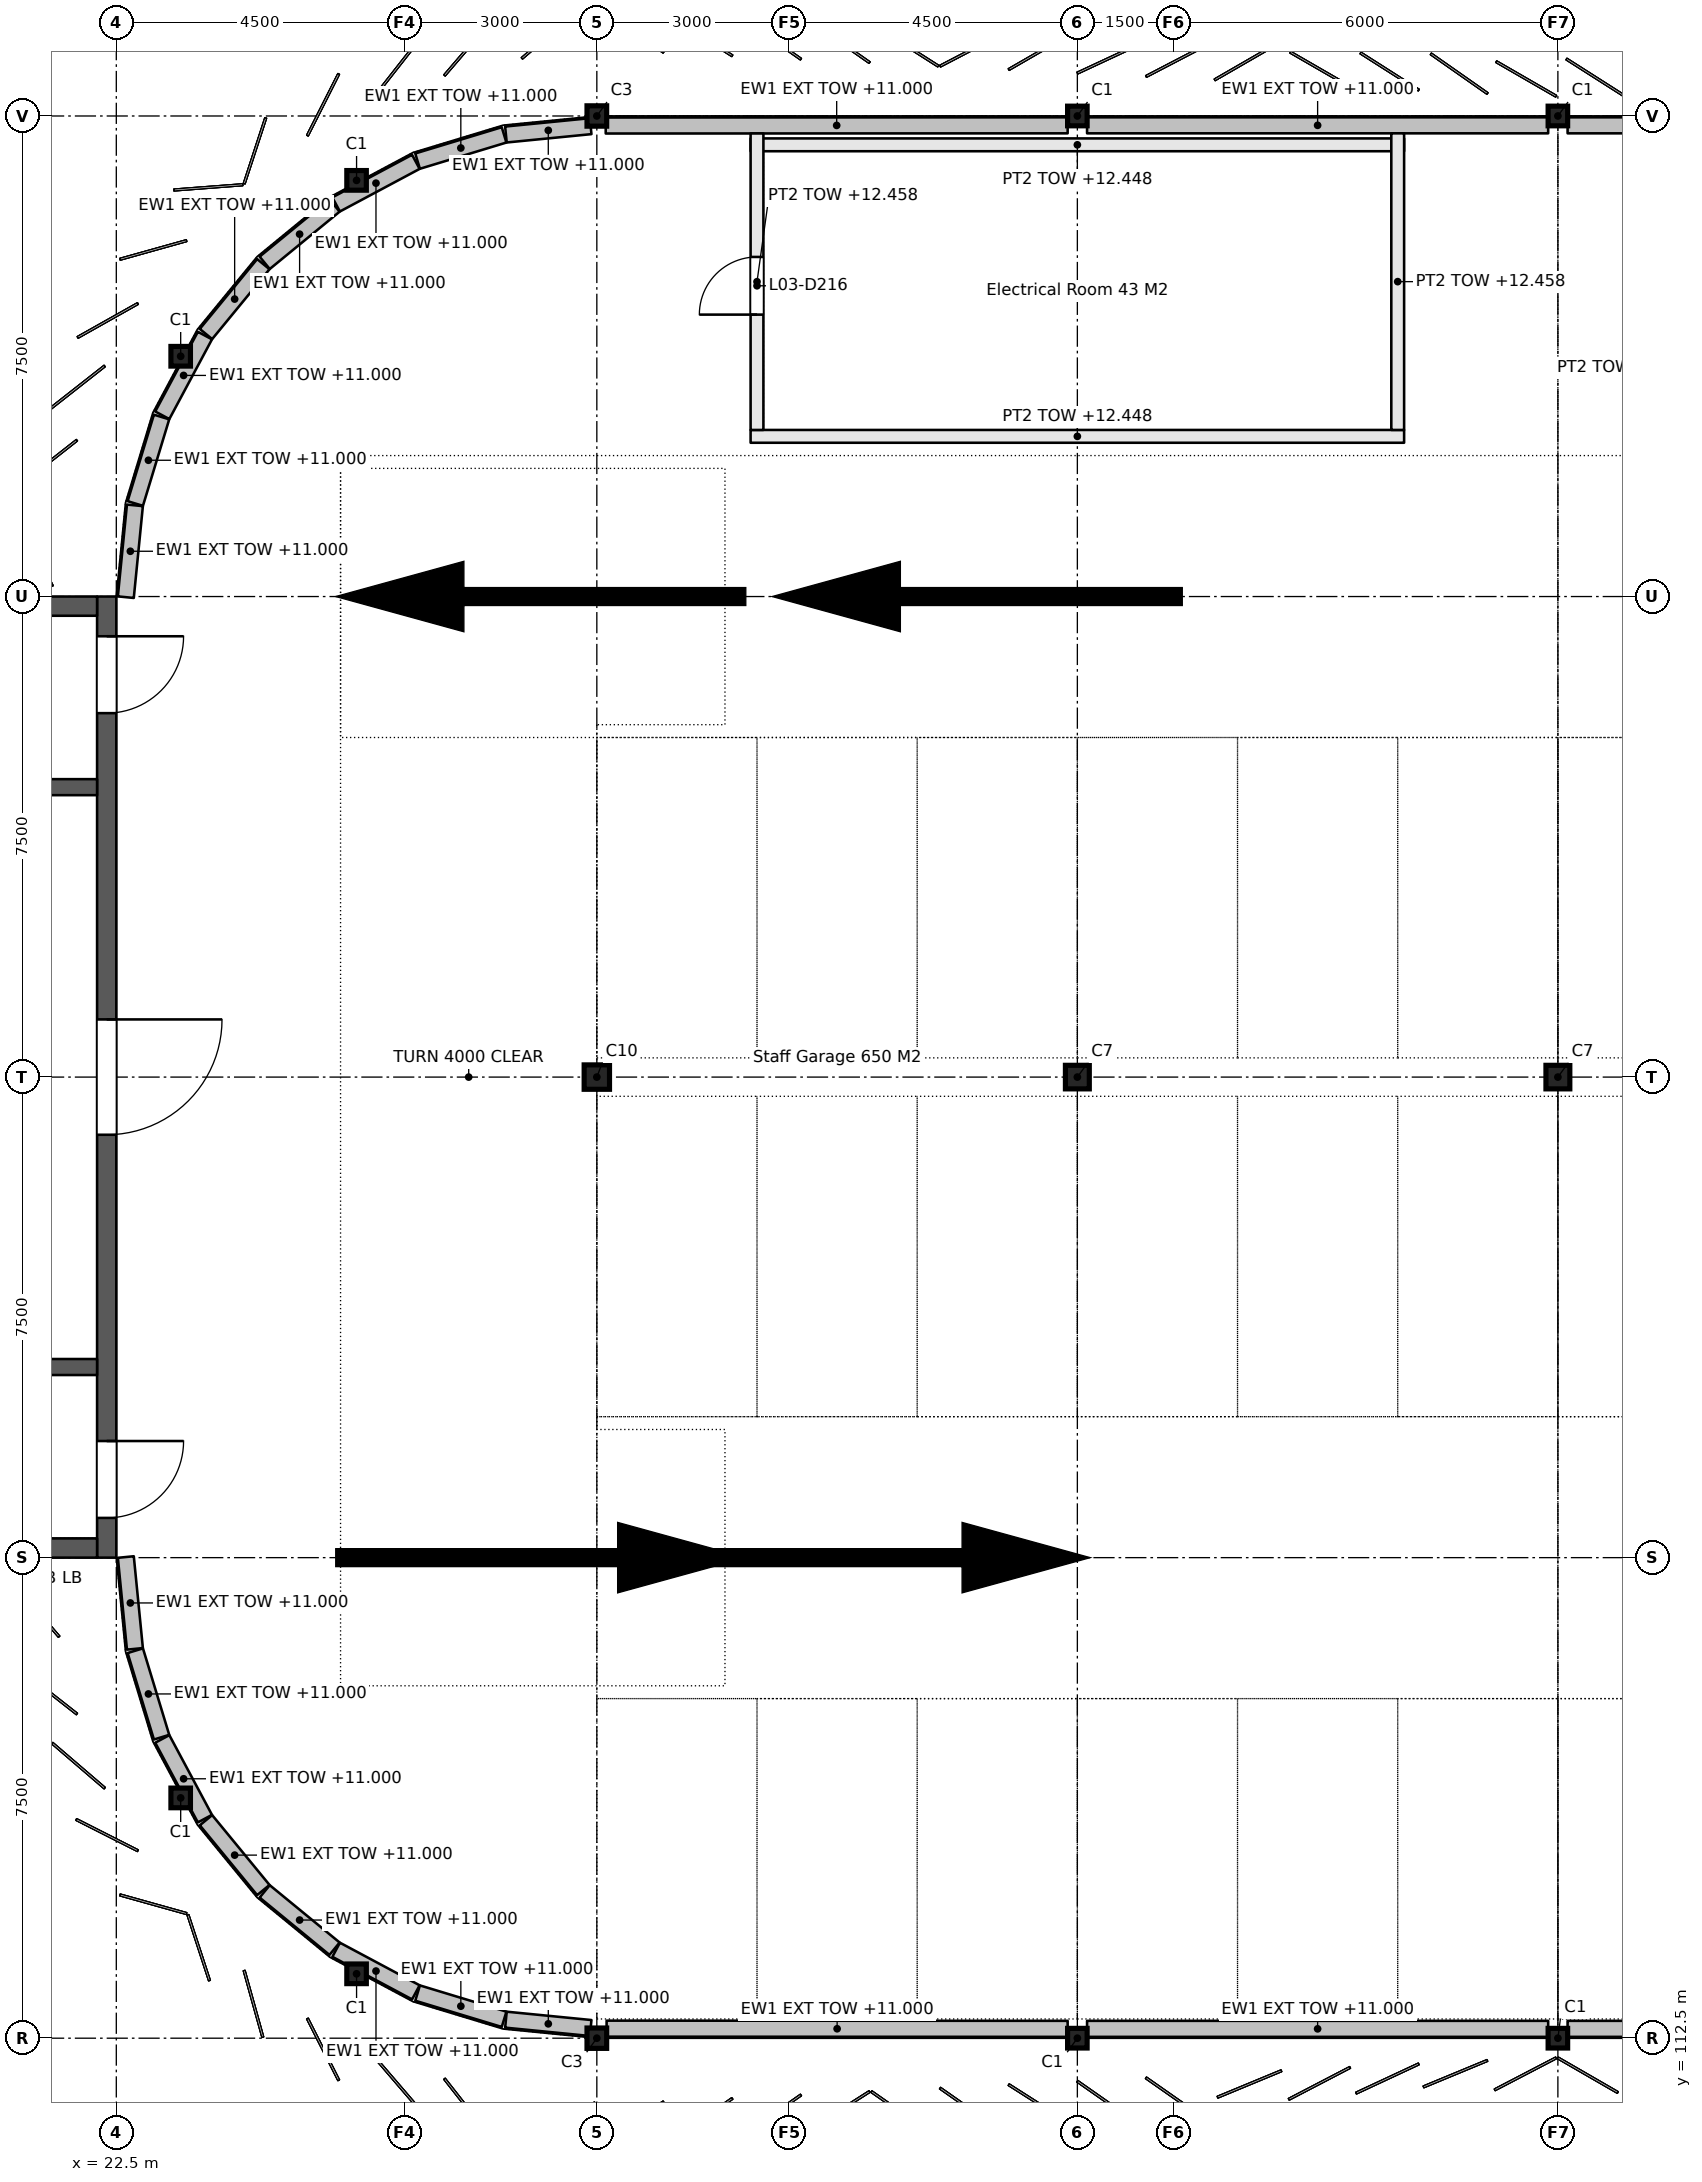
"""IFC4 building model, lengths in metres.
Left out: names, types, materials, properties, quantities, classifications, styles, units other than length and angle.
Written with IfcOpenShell. Run it as: python <this file> out.ifc"""

import sys

from ifc_helpers import new_model, si_unit, direction, frame, frame_2d, origin, origin_2d, place, context, subcontext, project, spatial, rectangle, i_section, extrude, element, fill, save


model = new_model("IFC4")
c1 = context("Model", 3, precision=1e-05, world=origin(), true_north=direction((0.0, 1.0)))
c2 = subcontext(c1, "Body", "Model", "MODEL_VIEW")
j1 = project(units=[si_unit("LENGTHUNIT", "METRE"), si_unit("PLANEANGLEUNIT", "RADIAN")], contexts=[c1])
p1 = place(None, origin())
s1 = spatial("IfcSite", under=j1, at=p1, CompositionType="ELEMENT")
p2 = place(p1, origin())
s2 = spatial("IfcBuilding", under=s1, at=p2, CompositionType="ELEMENT")
p3 = place(p2, frame((0.0, 0.0, 9.9)))
s3 = spatial("IfcBuildingStorey", under=s2, at=p3, CompositionType="ELEMENT", Elevation=9.9)
p4 = place(p3, frame((30.0, 112.5, 0.0), z_axis=(0.0, 0.0, 1.0), x_axis=(1.0, 0.0, 0.0)))
e1 = element("IfcColumn", 1, at=p4, inside=s3, PredefinedType="COLUMN", context=c2, shape_type="SweptSolid", body=[
    extrude(i_section(OverallWidth=0.307, OverallDepth=0.318, WebThickness=0.013, FlangeThickness=0.021, FilletRadius=0.015, at=origin_2d()), origin(), (0.0, 0.0, 1.0), 3.3),
])
p5 = place(p3, frame((30.0, 127.5, 0.0), z_axis=(0.0, 0.0, 1.0), x_axis=(1.0, 0.0, 0.0)))
e2 = element("IfcColumn", 2, at=p5, inside=s3, PredefinedType="COLUMN", context=c2, shape_type="SweptSolid", body=[
    extrude(i_section(OverallWidth=0.396, OverallDepth=0.381, WebThickness=0.019, FlangeThickness=0.03, FilletRadius=0.015, at=origin_2d()), origin(), (0.0, 0.0, 1.0), 3.3),
])
p6 = place(p3, frame((30.0, 142.5, 0.0), z_axis=(0.0, 0.0, 1.0), x_axis=(1.0, 0.0, 0.0)))
e3 = element("IfcColumn", 3, at=p6, inside=s3, PredefinedType="COLUMN", context=c2, shape_type="SweptSolid", body=[
    extrude(i_section(OverallWidth=0.307, OverallDepth=0.318, WebThickness=0.013, FlangeThickness=0.021, FilletRadius=0.015, at=origin_2d()), origin(), (0.0, 0.0, 1.0), 3.3),
])
p7 = place(p3, frame((37.5, 112.5, 0.0), z_axis=(0.0, 0.0, 1.0), x_axis=(1.0, 0.0, 0.0)))
e4 = element("IfcColumn", 4, at=p7, inside=s3, PredefinedType="COLUMN", context=c2, shape_type="SweptSolid", body=[
    extrude(i_section(OverallWidth=0.305, OverallDepth=0.307, WebThickness=0.01, FlangeThickness=0.015, FilletRadius=0.015, at=origin_2d()), origin(), (0.0, 0.0, 1.0), 3.3),
])
p8 = place(p3, frame((37.5, 127.5, 0.0), z_axis=(0.0, 0.0, 1.0), x_axis=(1.0, 0.0, 0.0)))
e5 = element("IfcColumn", 5, at=p8, inside=s3, PredefinedType="COLUMN", context=c2, shape_type="SweptSolid", body=[
    extrude(i_section(OverallWidth=0.373, OverallDepth=0.368, WebThickness=0.015, FlangeThickness=0.024, FilletRadius=0.015, at=origin_2d()), origin(), (0.0, 0.0, 1.0), 3.3),
])
for number, where, z_axis, x_axis in (
    (6, (37.5, 142.5, 0.0), (0.0, 0.0, 1.0), (1.0, 0.0, 0.0)),
    (7, (45.0, 112.5, 0.0), (0.0, 0.0, 1.0), (1.0, 0.0, 0.0)),
):
    element("IfcColumn", number, at=place(p3, frame(where, z_axis=z_axis, x_axis=x_axis)), inside=s3, PredefinedType="COLUMN", context=c2, shape_type="SweptSolid", body=[
        extrude(i_section(OverallWidth=0.305, OverallDepth=0.307, WebThickness=0.01, FlangeThickness=0.015, FilletRadius=0.015, at=origin_2d()), origin(), (0.0, 0.0, 1.0), 3.3),
    ])
p9 = place(p3, frame((45.0, 127.5, 0.0), z_axis=(0.0, 0.0, 1.0), x_axis=(1.0, 0.0, 0.0)))
e8 = element("IfcColumn", 8, at=p9, inside=s3, PredefinedType="COLUMN", context=c2, shape_type="SweptSolid", body=[
    extrude(i_section(OverallWidth=0.373, OverallDepth=0.368, WebThickness=0.015, FlangeThickness=0.024, FilletRadius=0.015, at=origin_2d()), origin(), (0.0, 0.0, 1.0), 3.3),
])
for number, where, z_axis, x_axis in (
    (9, (45.0, 142.5, 0.0), (0.0, 0.0, 1.0), (1.0, 0.0, 0.0)),
    (10, (23.505, 116.25, 0.0), (0.0, 0.0, 1.0), (1.0, 0.0, 0.0)),
    (11, (26.25, 113.505, 0.0), (0.0, 0.0, 1.0), (1.0, 0.0, 0.0)),
    (12, (26.25, 141.495, 0.0), (0.0, 0.0, 1.0), (1.0, 0.0, 0.0)),
    (13, (23.505, 138.75, 0.0), (0.0, 0.0, 1.0), (1.0, 0.0, 0.0)),
):
    element("IfcColumn", number, at=place(p3, frame(where, z_axis=z_axis, x_axis=x_axis)), inside=s3, PredefinedType="COLUMN", context=c2, shape_type="SweptSolid", body=[
        extrude(i_section(OverallWidth=0.305, OverallDepth=0.307, WebThickness=0.01, FlangeThickness=0.015, FilletRadius=0.015, at=origin_2d()), origin(), (0.0, 0.0, 1.0), 3.3),
    ])
for number, where, z_axis, x_axis in (
    (14, (32.4, 137.5, 0.0), (0.0, 0.0, 1.0), (1.0, 0.0, 0.0)),
    (15, (32.4, 142.05, 0.0), (0.0, 0.0, 1.0), (1.0, 0.0, 0.0)),
):
    element("IfcWall", number, at=place(p3, frame(where, z_axis=z_axis, x_axis=x_axis)), inside=s3, PredefinedType="PARTITIONING", context=c2, shape_type="SweptSolid", body=[
        extrude(rectangle(XDim=10.2, YDim=0.2, at=frame_2d((5.1, 0.0))), origin(), (0.0, 0.0, 1.0), 2.548),
    ])
p10 = place(p3, frame((32.5, 137.6, 0.0), z_axis=(0.0, 0.0, 1.0), x_axis=(0.0, 1.0, 0.0)))
e16 = element("IfcWall", 16, at=p10, inside=s3, PredefinedType="PARTITIONING", context=c2, shape_type="SweptSolid", body=[
    extrude(rectangle(XDim=4.627, YDim=0.2, at=frame_2d((2.313, 0.0))), origin(), (0.0, 0.0, 1.0), 2.558),
])
p11 = place(p10, frame((1.8, 0.0, 0.0)))
e17 = element("IfcOpeningElement", 17, at=p11, cuts=e16, PredefinedType="OPENING", context=c2, shape_type="SweptSolid", body=[
    extrude(rectangle(XDim=0.9, YDim=2.1, at=frame_2d((0.45, 1.05))), frame((0.0, 0.11, 0.0), z_axis=(0.0, -1.0, 0.0), x_axis=(1.0, 0.0, 0.0)), (0.0, 0.0, 1.0), 0.22),
])
p12 = place(p3, frame((42.5, 137.6, 0.0), z_axis=(0.0, 0.0, 1.0), x_axis=(0.0, 1.0, 0.0)))
e18 = element("IfcWall", 18, at=p12, inside=s3, PredefinedType="PARTITIONING", context=c2, shape_type="SweptSolid", body=[
    extrude(rectangle(XDim=4.629, YDim=0.2, at=frame_2d((2.314, 0.0))), origin(), (0.0, 0.0, 1.0), 2.558),
])
p13 = place(p3, frame((30.153, 112.649, 0.0), z_axis=(0.0, 0.0, 1.0), x_axis=(0.999999917119, -0.000407138461, 0.0)))
e19 = element("IfcWall", 19, at=p13, inside=s3, PredefinedType="SOLIDWALL", context=c2, shape_type="SweptSolid", body=[
    extrude(rectangle(XDim=7.196, YDim=0.25, at=frame_2d((3.598, 0.0))), origin(), (0.0, 0.0, 1.0), 1.1),
])
for number, where, z_axis, x_axis in (
    (20, (37.652, 112.646, 0.0), (0.0, 0.0, 1.0), (1.0, 0.0, 0.0)),
    (21, (45.152, 112.646, 0.0), (0.0, 0.0, 1.0), (1.0, 0.0, 0.0)),
    (22, (52.348, 142.354, 0.0), (0.0, 0.0, 1.0), (-1.0, 0.0, 0.0)),
    (23, (44.848, 142.354, 0.0), (0.0, 0.0, 1.0), (-1.0, 0.0, 0.0)),
):
    element("IfcWall", number, at=place(p3, frame(where, z_axis=z_axis, x_axis=x_axis)), inside=s3, PredefinedType="SOLIDWALL", context=c2, shape_type="SweptSolid", body=[
        extrude(rectangle(XDim=7.197, YDim=0.25, at=frame_2d((3.598, 0.0))), origin(), (0.0, 0.0, 1.0), 1.1),
    ])
p14 = place(p3, frame((37.348, 142.354, 0.0), z_axis=(0.0, 0.0, 1.0), x_axis=(-0.999999917439, -0.000406352613, 0.0)))
e24 = element("IfcWall", 24, at=p14, inside=s3, PredefinedType="SOLIDWALL", context=c2, shape_type="SweptSolid", body=[
    extrude(rectangle(XDim=7.21, YDim=0.25, at=frame_2d((3.605, 0.0))), origin(), (0.0, 0.0, 1.0), 1.1),
])
p15 = place(p3, frame((29.904, 142.341, 0.0), z_axis=(0.0, 0.0, 1.0), x_axis=(-0.995179797588, -0.098067173263, 0.0)))
e25 = element("IfcWall", 25, at=p15, inside=s3, PredefinedType="SOLIDWALL", context=c2, shape_type="SweptSolid", body=[
    extrude(rectangle(XDim=1.329, YDim=0.25, at=frame_2d((0.665, 0.0))), origin(), (0.0, 0.0, 1.0), 1.1),
])
p16 = place(p3, frame((28.552, 142.205, 0.0), z_axis=(0.0, 0.0, 1.0), x_axis=(-0.956979282244, -0.290156256793, 0.0)))
e26 = element("IfcWall", 26, at=p16, inside=s3, PredefinedType="SOLIDWALL", context=c2, shape_type="SweptSolid", body=[
    extrude(rectangle(XDim=1.411, YDim=0.25, at=frame_2d((0.706, 0.0))), origin(), (0.0, 0.0, 1.0), 1.1),
])
for number, where, z_axis, x_axis in (
    (27, (27.175, 141.784, 0.0), (0.0, 0.0, 1.0), (-0.882, -0.471, 0.0)),
    (28, (25.906, 141.103, 0.0), (0.0, 0.0, 1.0), (-0.773, -0.634, 0.0)),
    (29, (24.795, 140.188, 0.0), (0.0, 0.0, 1.0), (-0.635, -0.773, 0.0)),
    (30, (23.883, 139.073, 0.0), (0.0, 0.0, 1.0), (-0.472, -0.882, 0.0)),
):
    element("IfcWall", number, at=place(p3, frame(where, z_axis=z_axis, x_axis=x_axis)), inside=s3, PredefinedType="SOLIDWALL", context=c2, shape_type="SweptSolid", body=[
        extrude(rectangle(XDim=1.411, YDim=0.25, at=frame_2d((0.706, 0.0))), origin(), (0.0, 0.0, 1.0), 1.1),
    ])
p17 = place(p3, frame((23.206, 137.802, 0.0), z_axis=(0.0, 0.0, 1.0), x_axis=(-0.290679627319, -0.956820439927, 0.0)))
e31 = element("IfcWall", 31, at=p17, inside=s3, PredefinedType="SOLIDWALL", context=c2, shape_type="SweptSolid", body=[
    extrude(rectangle(XDim=1.411, YDim=0.25, at=frame_2d((0.706, 0.0))), origin(), (0.0, 0.0, 1.0), 1.1),
])
p18 = place(p3, frame((22.79, 136.423, 0.0), z_axis=(0.0, 0.0, 1.0), x_axis=(-0.098479948823, -0.995139035351, 0.0)))
e32 = element("IfcWall", 32, at=p18, inside=s3, PredefinedType="SOLIDWALL", context=c2, shape_type="SweptSolid", body=[
    extrude(rectangle(XDim=1.44, YDim=0.25, at=frame_2d((0.72, 0.0))), origin(), (0.0, 0.0, 1.0), 1.1),
])
p19 = place(p3, frame((22.648, 120.01, 0.0), z_axis=(0.0, 0.0, 1.0), x_axis=(0.098664443357, -0.995120760319, 0.0)))
e33 = element("IfcWall", 33, at=p19, inside=s3, PredefinedType="SOLIDWALL", context=c2, shape_type="SweptSolid", body=[
    extrude(rectangle(XDim=1.44, YDim=0.25, at=frame_2d((0.72, 0.0))), origin(), (0.0, 0.0, 1.0), 1.1),
])
p20 = place(p3, frame((22.796, 118.548, 0.0), z_axis=(0.0, 0.0, 1.0), x_axis=(0.29088617111, -0.956757668094, 0.0)))
e34 = element("IfcWall", 34, at=p20, inside=s3, PredefinedType="SOLIDWALL", context=c2, shape_type="SweptSolid", body=[
    extrude(rectangle(XDim=1.411, YDim=0.25, at=frame_2d((0.706, 0.0))), origin(), (0.0, 0.0, 1.0), 1.1),
])
p21 = place(p3, frame((23.218, 117.171, 0.0), z_axis=(0.0, 0.0, 1.0), x_axis=(0.471755514131, -0.881729400036, 0.0)))
e35 = element("IfcWall", 35, at=p21, inside=s3, PredefinedType="SOLIDWALL", context=c2, shape_type="SweptSolid", body=[
    extrude(rectangle(XDim=1.411, YDim=0.25, at=frame_2d((0.705, 0.0))), origin(), (0.0, 0.0, 1.0), 1.1),
])
for number, where, z_axis, x_axis in (
    (36, (23.9, 115.902, 0.0), (0.0, 0.0, 1.0), (0.635, -0.773, 0.0)),
    (37, (24.816, 114.792, 0.0), (0.0, 0.0, 1.0), (0.773, -0.634, 0.0)),
    (38, (25.931, 113.88, 0.0), (0.0, 0.0, 1.0), (0.882, -0.471, 0.0)),
    (39, (27.202, 113.204, 0.0), (0.0, 0.0, 1.0), (0.957, -0.29, 0.0)),
):
    element("IfcWall", number, at=place(p3, frame(where, z_axis=z_axis, x_axis=x_axis)), inside=s3, PredefinedType="SOLIDWALL", context=c2, shape_type="SweptSolid", body=[
        extrude(rectangle(XDim=1.411, YDim=0.25, at=frame_2d((0.706, 0.0))), origin(), (0.0, 0.0, 1.0), 1.1),
    ])
p22 = place(p3, frame((28.581, 112.789, 0.0), z_axis=(0.0, 0.0, 1.0), x_axis=(0.995176263333, -0.098103032051, 0.0)))
e40 = element("IfcWall", 40, at=p22, inside=s3, PredefinedType="SOLIDWALL", context=c2, shape_type="SweptSolid", body=[
    extrude(rectangle(XDim=1.329, YDim=0.25, at=frame_2d((0.665, 0.0))), origin(), (0.0, 0.0, 1.0), 1.1),
])
p23 = place(p3, frame((22.35, 135.0, 0.0), z_axis=(0.0, 0.0, 1.0), x_axis=(0.0, -1.0, 0.0)))
e41 = element("IfcWall", 41, at=p23, inside=s3, PredefinedType="SHEAR", context=c2, shape_type="SweptSolid", body=[
    extrude(rectangle(XDim=15.0, YDim=0.3, at=frame_2d((7.5, 0.0))), origin(), (0.0, 0.0, 1.0), 3.3),
])
p24 = place(p23, frame((13.18, 0.0, 0.0)))
e42 = element("IfcOpeningElement", 42, at=p24, cuts=e41, PredefinedType="OPENING", context=c2, shape_type="SweptSolid", body=[
    extrude(rectangle(XDim=1.2, YDim=2.1, at=frame_2d((0.6, 1.05))), frame((0.0, 0.16, 0.0), z_axis=(0.0, -1.0, 0.0), x_axis=(1.0, 0.0, 0.0)), (0.0, 0.0, 1.0), 0.32),
])
p25 = place(p23, frame((0.62, 0.0, 0.0)))
e43 = element("IfcOpeningElement", 43, at=p25, cuts=e41, PredefinedType="OPENING", context=c2, shape_type="SweptSolid", body=[
    extrude(rectangle(XDim=1.2, YDim=2.1, at=frame_2d((0.6, 1.05))), frame((0.0, 0.16, 0.0), z_axis=(0.0, -1.0, 0.0), x_axis=(1.0, 0.0, 0.0)), (0.0, 0.0, 1.0), 0.32),
])
p26 = place(p23, frame((6.6, 0.0, 0.0)))
e44 = element("IfcOpeningElement", 44, at=p26, cuts=e41, PredefinedType="OPENING", context=c2, shape_type="SweptSolid", body=[
    extrude(rectangle(XDim=1.8, YDim=2.1, at=frame_2d((0.9, 1.05))), frame((0.0, 0.16, 0.0), z_axis=(0.0, -1.0, 0.0), x_axis=(1.0, 0.0, 0.0)), (0.0, 0.0, 1.0), 0.32),
])
for number, where, z_axis, x_axis in (
    (45, (22.2, 120.15, 0.0), (0.0, 0.0, 1.0), (-1.0, 0.0, 0.0)),
    (46, (14.0, 134.85, 0.0), (0.0, 0.0, 1.0), (1.0, 0.0, 0.0)),
):
    element("IfcWall", number, at=place(p3, frame(where, z_axis=z_axis, x_axis=x_axis)), inside=s3, PredefinedType="SHEAR", context=c2, shape_type="SweptSolid", body=[
        extrude(rectangle(XDim=8.2, YDim=0.3, at=frame_2d((4.1, 0.0))), origin(), (0.0, 0.0, 1.0), 3.3),
    ])
p27 = place(p3, frame((22.2, 122.975, 0.0), z_axis=(0.0, 0.0, 1.0), x_axis=(-1.0, 0.0, 0.0)))
e47 = element("IfcWall", 47, at=p27, inside=s3, PredefinedType="STANDARD", context=c2, shape_type="SweptSolid", body=[
    extrude(rectangle(XDim=3.7, YDim=0.25, at=frame_2d((1.85, 0.0))), origin(), (0.0, 0.0, 1.0), 3.1),
])
p28 = place(p27, frame((1.0, 0.0, 0.0)))
e48 = element("IfcOpeningElement", 48, at=p28, cuts=e47, PredefinedType="OPENING", context=c2, shape_type="SweptSolid", body=[
    extrude(rectangle(XDim=0.9, YDim=2.1, at=frame_2d((0.45, 1.05))), frame((0.0, 0.135, 0.0), z_axis=(0.0, -1.0, 0.0), x_axis=(1.0, 0.0, 0.0)), (0.0, 0.0, 1.0), 0.27),
])
p29 = place(p3, frame((18.5, 132.025, 0.0), z_axis=(0.0, 0.0, 1.0), x_axis=(1.0, 0.0, 0.0)))
e49 = element("IfcWall", 49, at=p29, inside=s3, PredefinedType="STANDARD", context=c2, shape_type="SweptSolid", body=[
    extrude(rectangle(XDim=3.7, YDim=0.25, at=frame_2d((1.85, 0.0))), origin(), (0.0, 0.0, 1.0), 3.1),
])
p30 = place(p29, frame((1.8, 0.0, 0.0)))
e50 = element("IfcOpeningElement", 50, at=p30, cuts=e49, PredefinedType="OPENING", context=c2, shape_type="SweptSolid", body=[
    extrude(rectangle(XDim=0.9, YDim=2.1, at=frame_2d((0.45, 1.05))), frame((0.0, 0.135, 0.0), z_axis=(0.0, -1.0, 0.0), x_axis=(1.0, 0.0, 0.0)), (0.0, 0.0, 1.0), 0.27),
])
p31 = place(p11, origin())
e51 = element("IfcDoor", 51, at=p31, inside=s3, OperationType="SINGLE_SWING_RIGHT", PredefinedType="DOOR", context=c2, shape_type="SweptSolid", body=[
    extrude(rectangle(XDim=0.9, YDim=2.1, at=frame_2d((0.45, 1.05))), frame((0.0, 0.025, 0.0), z_axis=(0.0, -1.0, 0.0), x_axis=(1.0, 0.0, 0.0)), (0.0, 0.0, 1.0), 0.05),
])
fill(e17, e51)
p32 = place(p24, origin())
e52 = element("IfcDoor", 52, at=p32, inside=s3, OperationType="SINGLE_SWING_RIGHT", PredefinedType="DOOR", context=c2, shape_type="SweptSolid", body=[
    extrude(rectangle(XDim=1.2, YDim=2.1, at=frame_2d((0.6, 1.05))), frame((0.0, 0.025, 0.0), z_axis=(0.0, -1.0, 0.0), x_axis=(1.0, 0.0, 0.0)), (0.0, 0.0, 1.0), 0.05),
])
fill(e42, e52)
p33 = place(p25, origin())
e53 = element("IfcDoor", 53, at=p33, inside=s3, OperationType="SINGLE_SWING_LEFT", PredefinedType="DOOR", context=c2, shape_type="SweptSolid", body=[
    extrude(rectangle(XDim=1.2, YDim=2.1, at=frame_2d((0.6, 1.05))), frame((0.0, 0.025, 0.0), z_axis=(0.0, -1.0, 0.0), x_axis=(1.0, 0.0, 0.0)), (0.0, 0.0, 1.0), 0.05),
])
fill(e43, e53)
p34 = place(p26, origin())
e54 = element("IfcDoor", 54, at=p34, inside=s3, OperationType="DOUBLE_DOOR_SINGLE_SWING", PredefinedType="DOOR", context=c2, shape_type="SweptSolid", body=[
    extrude(rectangle(XDim=1.8, YDim=2.1, at=frame_2d((0.9, 1.05))), frame((0.0, 0.025, 0.0), z_axis=(0.0, -1.0, 0.0), x_axis=(1.0, 0.0, 0.0)), (0.0, 0.0, 1.0), 0.05),
])
fill(e44, e54)
save(model, sys.argv[1])
